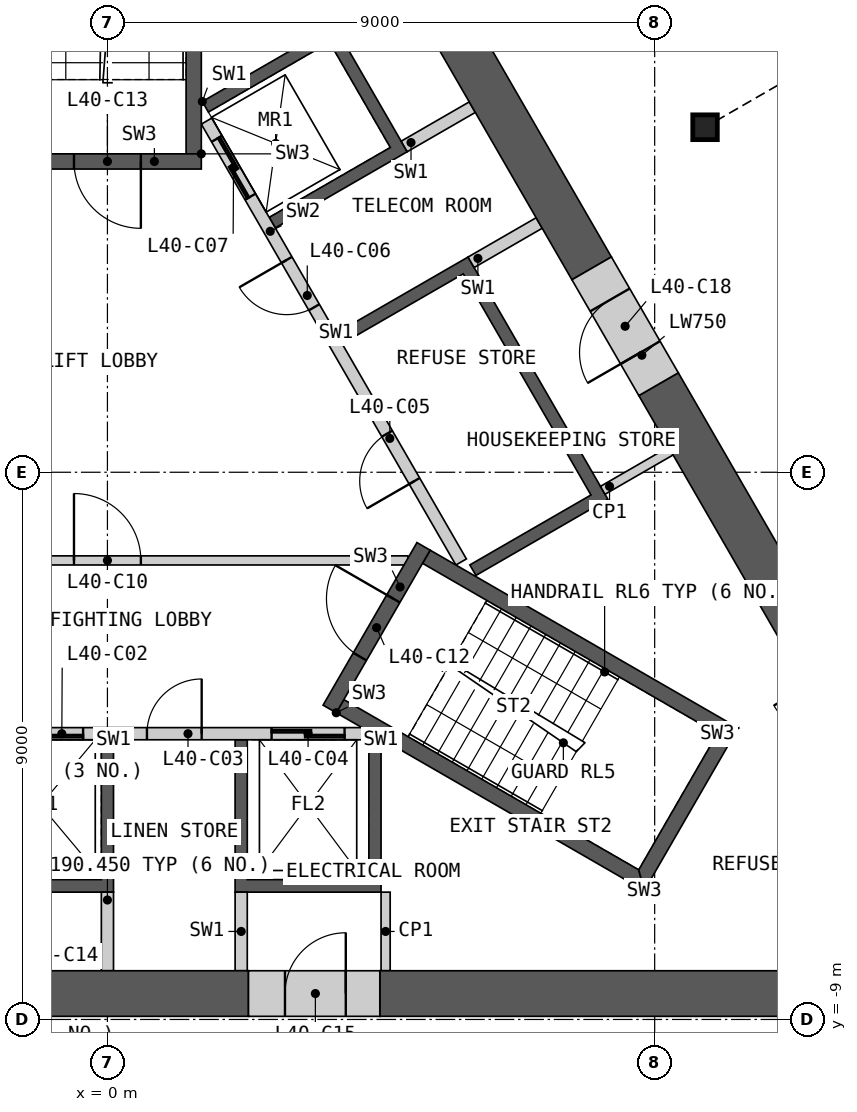
"""IFC4 building model, lengths in metres.
Left out: names, types, materials, properties, quantities, classifications, styles, units other than length and angle.
Written with IfcOpenShell. Run it as: python <this file> out.ifc"""

import sys

from ifc_helpers import new_model, si_unit, direction, frame, frame_2d, origin, origin_2d, place, context, subcontext, project, spatial, polyline, rectangle, i_section, outline, extrude, element, fill, save


model = new_model("IFC4")
c1 = context("Model", 3, precision=1e-05, world=origin(), true_north=direction((0.0, 1.0)))
c2 = subcontext(c1, "Body", "Model", "MODEL_VIEW")
j1 = project(units=[si_unit("LENGTHUNIT", "METRE"), si_unit("PLANEANGLEUNIT", "RADIAN")], contexts=[c1])
p1 = place(None, origin())
s1 = spatial("IfcSite", under=j1, at=p1, CompositionType="ELEMENT")
p2 = place(p1, origin())
s2 = spatial("IfcBuilding", under=s1, at=p2, CompositionType="ELEMENT")
p3 = place(p2, frame((0.0, 0.0, 187.2)))
s3 = spatial("IfcBuildingStorey", under=s2, at=p3, CompositionType="ELEMENT", Elevation=187.2)
p4 = place(p3, frame((9.828, 5.675, 0.0), z_axis=(0.0, 0.0, 1.0), x_axis=(1.0, 0.0, 0.0)))
e1 = element("IfcColumn", 1, at=p4, inside=s3, PredefinedType="COLUMN", context=c2, shape_type="SweptSolid", body=[
    extrude(i_section(OverallWidth=0.404, OverallDepth=0.407, WebThickness=0.027, FlangeThickness=0.044, at=origin_2d()), origin(), (0.0, 0.0, 1.0), 3.6),
])
p5 = place(p3, origin())
e2 = element("IfcWall", 2, at=p5, inside=s3, PredefinedType="SHEAR", context=c2, shape_type="SweptSolid", body=[
    extrude(outline(polyline([(4.5, -4.4), (4.5, -6.906), (2.1, -6.906), (2.1, -4.4), (2.3, -4.4), (2.3, -6.7), (4.3, -6.7), (4.3, -4.4), (4.5, -4.4)])), origin(), (0.0, 0.0, 1.0), 3.25),
])
p6 = place(p3, origin())
e3 = element("IfcWall", 3, at=p6, inside=s3, PredefinedType="SHEAR", context=c2, shape_type="SweptSolid", body=[
    extrude(outline(polyline([(0.1, -4.4), (0.1, -6.906), (-4.5, -6.906), (-4.5, -4.4), (-4.3, -4.4), (-4.3, -6.7), (-2.3, -6.7), (-2.3, -4.4), (-2.1, -4.4), (-2.1, -6.7), (-0.1, -6.7), (-0.1, -4.4), (0.1, -4.4)])), origin(), (0.0, 0.0, 1.0), 3.25),
])
p7 = place(p3, frame((-4.187, -4.3, 0.0), z_axis=(0.0, 0.0, 1.0), x_axis=(1.0, 0.0, 0.0)))
e4 = element("IfcWall", 4, at=p7, inside=s3, PredefinedType="SOLIDWALL", context=c2, shape_type="SweptSolid", body=[
    extrude(rectangle(XDim=8.373, YDim=0.2, at=frame_2d((4.187, 0.0))), origin(), (0.0, 0.0, 1.0), 3.25),
])
p8 = place(p7, frame((0.287, 0.0, 0.0)))
e5 = element("IfcOpeningElement", 5, at=p8, cuts=e4, PredefinedType="OPENING", context=c2, shape_type="SweptSolid", body=[
    extrude(rectangle(XDim=1.2, YDim=2.1, at=frame_2d((0.6, 1.05))), frame((0.0, 0.11, 0.0), z_axis=(0.0, -1.0, 0.0), x_axis=(1.0, 0.0, 0.0)), (0.0, 0.0, 1.0), 0.22),
])
p9 = place(p7, frame((2.387, 0.0, 0.0)))
e6 = element("IfcOpeningElement", 6, at=p9, cuts=e4, PredefinedType="OPENING", context=c2, shape_type="SweptSolid", body=[
    extrude(rectangle(XDim=1.4, YDim=2.1, at=frame_2d((0.7, 1.05))), frame((0.0, 0.11, 0.0), z_axis=(0.0, -1.0, 0.0), x_axis=(1.0, 0.0, 0.0)), (0.0, 0.0, 1.0), 0.22),
])
p10 = place(p7, frame((4.837, 0.0, 0.0)))
e7 = element("IfcOpeningElement", 7, at=p10, cuts=e4, PredefinedType="OPENING", context=c2, shape_type="SweptSolid", body=[
    extrude(rectangle(XDim=0.9, YDim=2.1, at=frame_2d((0.45, 1.05))), frame((0.0, 0.11, 0.0), z_axis=(0.0, -1.0, 0.0), x_axis=(1.0, 0.0, 0.0)), (0.0, 0.0, 1.0), 0.22),
])
p11 = place(p7, frame((6.887, 0.0, 0.0)))
e8 = element("IfcOpeningElement", 8, at=p11, cuts=e4, PredefinedType="OPENING", context=c2, shape_type="SweptSolid", body=[
    extrude(rectangle(XDim=1.2, YDim=2.1, at=frame_2d((0.6, 1.05))), frame((0.0, 0.11, 0.0), z_axis=(0.0, -1.0, 0.0), x_axis=(1.0, 0.0, 0.0)), (0.0, 0.0, 1.0), 0.22),
])
for number, where, z_axis, x_axis in (
    (9, (0.0, -6.906, 0.0), (0.0, 0.0, 1.0), (0.0, -1.0, 0.0)),
    (10, (2.2, -6.906, 0.0), (0.0, 0.0, 1.0), (0.0, -1.0, 0.0)),
):
    element("IfcWall", number, at=place(p3, frame(where, z_axis=z_axis, x_axis=x_axis)), inside=s3, PredefinedType="SHEAR", context=c2, shape_type="SweptSolid", body=[
        extrude(rectangle(XDim=1.293, YDim=0.2, at=frame_2d((0.646, 0.0))), origin(), (0.0, 0.0, 1.0), 3.25),
    ])
p12 = place(p3, origin())
e11 = element("IfcWall", 11, at=p12, inside=s3, PredefinedType="SHEAR", context=c2, shape_type="SweptSolid", body=[
    extrude(outline(polyline([(1.561, 6.097), (3.731, 7.35), (4.931, 5.272), (2.76, 4.019), (2.66, 4.192), (4.652, 5.342), (3.652, 7.074), (1.66, 5.924), (1.561, 6.097)])), origin(), (0.0, 0.0, 1.0), 3.25),
])
p13 = place(p3, origin())
e12 = element("IfcWall", 12, at=p13, inside=s3, PredefinedType="SHEAR", context=c2, shape_type="SweptSolid", body=[
    extrude(outline(polyline([(3.76, 2.287), (5.931, 3.54), (8.231, -0.444), (6.061, -1.697), (5.96, -1.524), (7.952, -0.374), (5.852, 3.263), (3.861, 2.113), (3.76, 2.287)])), origin(), (0.0, 0.0, 1.0), 3.25),
])
p14 = place(p3, frame((5.817, -1.476, 0.0), z_axis=(0.0, 0.0, 1.0), x_axis=(-0.500002616675, 0.866023893041, 0.0)))
e13 = element("IfcWall", 13, at=p14, inside=s3, PredefinedType="SOLIDWALL", context=c2, shape_type="SweptSolid", body=[
    extrude(rectangle(XDim=8.373, YDim=0.2, at=frame_2d((4.187, 0.0))), origin(), (0.0, 0.0, 1.0), 3.25),
])
p15 = place(p14, frame((1.537, 0.0, 0.0)))
e14 = element("IfcOpeningElement", 14, at=p15, cuts=e13, PredefinedType="OPENING", context=c2, shape_type="SweptSolid", body=[
    extrude(rectangle(XDim=0.9, YDim=2.1, at=frame_2d((0.45, 1.05))), frame((0.0, 0.11, 0.0), z_axis=(0.0, -1.0, 0.0), x_axis=(1.0, 0.0, 0.0)), (0.0, 0.0, 1.0), 0.22),
])
p16 = place(p14, frame((4.837, 0.0, 0.0)))
e15 = element("IfcOpeningElement", 15, at=p16, cuts=e13, PredefinedType="OPENING", context=c2, shape_type="SweptSolid", body=[
    extrude(rectangle(XDim=0.9, YDim=2.1, at=frame_2d((0.45, 1.05))), frame((0.0, 0.11, 0.0), z_axis=(0.0, -1.0, 0.0), x_axis=(1.0, 0.0, 0.0)), (0.0, 0.0, 1.0), 0.22),
])
p17 = place(p14, frame((6.937, 0.0, 0.0)))
e16 = element("IfcOpeningElement", 16, at=p17, cuts=e13, PredefinedType="OPENING", context=c2, shape_type="SweptSolid", body=[
    extrude(rectangle(XDim=1.1, YDim=2.1, at=frame_2d((0.55, 1.05))), frame((0.0, 0.11, 0.0), z_axis=(0.0, -1.0, 0.0), x_axis=(1.0, 0.0, 0.0)), (0.0, 0.0, 1.0), 0.22),
])
p18 = place(p3, frame((5.981, 3.453, 0.0), z_axis=(0.0, 0.0, 1.0), x_axis=(0.865968639725, 0.500098305348, 0.0)))
e17 = element("IfcWall", 17, at=p18, inside=s3, PredefinedType="SHEAR", context=c2, shape_type="SweptSolid", body=[
    extrude(rectangle(XDim=1.293, YDim=0.2, at=frame_2d((0.646, 0.0))), origin(), (0.0, 0.0, 1.0), 3.25),
])
p19 = place(p3, frame((4.881, 5.358, 0.0), z_axis=(0.0, 0.0, 1.0), x_axis=(0.866084958089, 0.499896834728, 0.0)))
e18 = element("IfcWall", 18, at=p19, inside=s3, PredefinedType="SHEAR", context=c2, shape_type="SweptSolid", body=[
    extrude(rectangle(XDim=1.293, YDim=0.2, at=frame_2d((0.646, 0.0))), origin(), (0.0, 0.0, 1.0), 3.25),
])
p20 = place(p3, frame((-4.941, -1.45, 0.0), z_axis=(0.0, 0.0, 1.0), x_axis=(1.0, 0.0, 0.0)))
e19 = element("IfcWall", 19, at=p20, inside=s3, PredefinedType="PARTITIONING", context=c2, shape_type="SweptSolid", body=[
    extrude(rectangle(XDim=9.882, YDim=0.15, at=frame_2d((4.941, 0.0))), origin(), (0.0, 0.0, 1.0), 3.25),
])
p21 = place(p20, frame((4.391, 0.0, 0.0)))
e20 = element("IfcOpeningElement", 20, at=p21, cuts=e19, PredefinedType="OPENING", context=c2, shape_type="SweptSolid", body=[
    extrude(rectangle(XDim=1.1, YDim=2.1, at=frame_2d((0.55, 1.05))), frame((0.0, 0.085, 0.0), z_axis=(0.0, -1.0, 0.0), x_axis=(1.0, 0.0, 0.0)), (0.0, 0.0, 1.0), 0.17),
])
p22 = place(p3, origin())
e21 = element("IfcWall", 21, at=p22, inside=s3, PredefinedType="SHEAR", context=c2, shape_type="SweptSolid", body=[
    extrude(outline(polyline([(3.763, -3.956), (8.83, -6.881), (8.738, -6.539), (3.888, -3.739), (3.763, -3.956)])), origin(), (0.0, 0.0, 1.0), 3.25),
])
p23 = place(p3, origin())
e22 = element("IfcWall", 22, at=p23, inside=s3, PredefinedType="SHEAR", context=c2, shape_type="SweptSolid", body=[
    extrude(outline(polyline([(8.83, -6.881), (10.374, -4.206), (10.032, -4.298), (8.738, -6.539), (8.83, -6.881)])), origin(), (0.0, 0.0, 1.0), 3.25),
])
p24 = place(p3, origin())
e23 = element("IfcWall", 23, at=p24, inside=s3, PredefinedType="SHEAR", context=c2, shape_type="SweptSolid", body=[
    extrude(outline(polyline([(10.032, -4.298), (10.374, -4.206), (5.307, -1.281), (5.182, -1.498), (10.032, -4.298)])), origin(), (0.0, 0.0, 1.0), 3.25),
])
p25 = place(p3, frame((3.655, -3.893, 0.0), z_axis=(0.0, 0.0, 1.0), x_axis=(0.499982516597, 0.866035497597, 0.0)))
e24 = element("IfcWall", 24, at=p25, inside=s3, PredefinedType="SHEAR", context=c2, shape_type="SweptSolid", body=[
    extrude(rectangle(XDim=3.088, YDim=0.25, at=frame_2d((1.544, 0.0))), origin(), (0.0, 0.0, 1.0), 3.25),
])
p26 = place(p25, frame((0.994, 0.0, 0.0)))
e25 = element("IfcOpeningElement", 25, at=p26, cuts=e24, PredefinedType="OPENING", context=c2, shape_type="SweptSolid", body=[
    extrude(rectangle(XDim=1.1, YDim=2.1, at=frame_2d((0.55, 1.05))), frame((0.0, 0.135, 0.0), z_axis=(0.0, -1.0, 0.0), x_axis=(1.0, 0.0, 0.0)), (0.0, 0.0, 1.0), 0.27),
])
p27 = place(p3, origin())
e26 = element("IfcWall", 26, at=p27, inside=s3, PredefinedType="SHEAR", context=c2, shape_type="SweptSolid", body=[
    extrude(outline(polyline([(1.544, 5.237), (1.544, 11.087), (1.294, 10.837), (1.294, 5.237), (1.544, 5.237)])), origin(), (0.0, 0.0, 1.0), 3.25),
])
p28 = place(p3, frame((1.544, 5.112, 0.0), z_axis=(0.0, 0.0, 1.0), x_axis=(-1.0, 0.0, 0.0)))
e27 = element("IfcWall", 27, at=p28, inside=s3, PredefinedType="SHEAR", context=c2, shape_type="SweptSolid", body=[
    extrude(rectangle(XDim=3.088, YDim=0.25, at=frame_2d((1.544, 0.0))), origin(), (0.0, 0.0, 1.0), 3.25),
])
p29 = place(p28, frame((0.994, 0.0, 0.0)))
e28 = element("IfcOpeningElement", 28, at=p29, cuts=e27, PredefinedType="OPENING", context=c2, shape_type="SweptSolid", body=[
    extrude(rectangle(XDim=1.1, YDim=2.1, at=frame_2d((0.55, 1.05))), frame((0.0, 0.135, 0.0), z_axis=(0.0, -1.0, 0.0), x_axis=(1.0, 0.0, 0.0)), (0.0, 0.0, 1.0), 0.27),
])
for number, where, z_axis, x_axis in (
    (29, (4.575, -6.906, 0.0), (0.0, 0.0, 1.0), (0.0, -1.0, 0.0)),
    (30, (9.266, 0.349, 0.0), (0.0, 0.0, 1.0), (-0.866, -0.5, 0.0)),
):
    element("IfcWall", number, at=place(p3, frame(where, z_axis=z_axis, x_axis=x_axis)), inside=s3, PredefinedType="PARTITIONING", context=c2, shape_type="SweptSolid", body=[
        extrude(rectangle(XDim=1.293, YDim=0.15, at=frame_2d((0.646, 0.0))), origin(), (0.0, 0.0, 1.0), 3.25),
    ])
p30 = place(p3, frame((4.48, -8.574, 0.0), z_axis=(0.0, 0.0, 1.0), x_axis=(1.0, 0.0, 0.0)))
e31 = element("IfcWall", 31, at=p30, inside=s3, PredefinedType="SHEAR", context=c2, shape_type="SweptSolid", body=[
    extrude(rectangle(XDim=9.721, YDim=0.75, at=frame_2d((4.86, 0.0))), origin(), (0.0, 0.0, 1.0), 3.25),
])
p31 = place(p3, frame((-1.2, -8.574, 0.0), z_axis=(0.0, 0.0, 1.0), x_axis=(1.0, 0.0, 0.0)))
e32 = element("IfcWall", 32, at=p31, inside=s3, PredefinedType="SHEAR", context=c2, shape_type="SweptSolid", body=[
    extrude(rectangle(XDim=3.52, YDim=0.75, at=frame_2d((1.76, 0.0))), origin(), (0.0, 0.0, 1.0), 3.25),
])
p32 = place(p3, frame((7.964, 3.354, 0.0), z_axis=(0.0, 0.0, 1.0), x_axis=(-0.50002928721, 0.866008494146, 0.0)))
e33 = element("IfcWall", 33, at=p32, inside=s3, PredefinedType="SHEAR", context=c2, shape_type="SweptSolid", body=[
    extrude(rectangle(XDim=6.405, YDim=0.75, at=frame_2d((3.203, 0.0))), origin(), (0.0, 0.0, 1.0), 3.25),
])
p33 = place(p3, frame((11.527, -2.817, 0.0), z_axis=(0.0, 0.0, 1.0), x_axis=(-0.50001992892, 0.866013897511, 0.0)))
e34 = element("IfcWall", 34, at=p33, inside=s3, PredefinedType="SHEAR", context=c2, shape_type="SweptSolid", body=[
    extrude(rectangle(XDim=4.926, YDim=0.75, at=frame_2d((2.463, 0.0))), origin(), (0.0, 0.0, 1.0), 3.25),
])
p34 = place(p3, frame((2.32, -8.574, 0.0), z_axis=(0.0, 0.0, 1.0), x_axis=(1.0, 0.0, 0.0)))
e35 = element("IfcWall", 35, at=p34, inside=s3, PredefinedType="SHEAR", context=c2, shape_type="SweptSolid", body=[
    extrude(rectangle(XDim=2.16, YDim=0.75, at=frame_2d((1.08, 0.0))), origin(), (0.0, 0.0, 1.0), 3.25),
])
p35 = place(p34, frame((0.6, 0.0, 0.0)))
e36 = element("IfcOpeningElement", 36, at=p35, cuts=e35, PredefinedType="OPENING", context=c2, shape_type="SweptSolid", body=[
    extrude(rectangle(XDim=1.0, YDim=2.1, at=frame_2d((0.5, 1.05))), frame((0.0, 0.385, 0.0), z_axis=(0.0, -1.0, 0.0), x_axis=(1.0, 0.0, 0.0)), (0.0, 0.0, 1.0), 0.77),
])
p36 = place(p3, frame((9.064, 1.448, 0.0), z_axis=(0.0, 0.0, 1.0), x_axis=(-0.50002983664, 0.866008176907, 0.0)))
e37 = element("IfcWall", 37, at=p36, inside=s3, PredefinedType="SHEAR", context=c2, shape_type="SweptSolid", body=[
    extrude(rectangle(XDim=2.2, YDim=0.75, at=frame_2d((1.1, 0.0))), origin(), (0.0, 0.0, 1.0), 3.25),
])
p37 = place(p36, frame((0.6, 0.0, 0.0)))
e38 = element("IfcOpeningElement", 38, at=p37, cuts=e37, PredefinedType="OPENING", context=c2, shape_type="SweptSolid", body=[
    extrude(rectangle(XDim=1.0, YDim=2.1, at=frame_2d((0.5, 1.05))), frame((0.0, 0.385, 0.0), z_axis=(0.0, -1.0, 0.0), x_axis=(1.0, 0.0, 0.0)), (0.0, 0.0, 1.0), 0.77),
])
p38 = place(p3, frame((5.377, 19.385, 0.0), z_axis=(0.0, 0.0, 1.0), x_axis=(0.500000757641, -0.86602496636, 0.0)))
e39 = element("IfcWall", 39, at=p38, inside=s3, PredefinedType="PARTITIONING", context=c2, shape_type="SweptSolid", body=[
    extrude(rectangle(XDim=28.198, YDim=0.2, at=frame_2d((14.099, 0.0))), origin(), (0.0, 0.0, 1.0), 3.25),
])
p39 = place(p38, frame((22.735, 0.0, 0.0)))
e40 = element("IfcOpeningElement", 40, at=p39, cuts=e39, PredefinedType="OPENING", context=c2, shape_type="SweptSolid", body=[
    extrude(rectangle(XDim=1.8, YDim=2.1, at=frame_2d((0.9, 1.05))), frame((0.0, 0.11, 0.0), z_axis=(0.0, -1.0, 0.0), x_axis=(1.0, 0.0, 0.0)), (0.0, 0.0, 1.0), 0.22),
])
p40 = place(p38, frame((14.402, 0.0, 0.0)))
e41 = element("IfcOpeningElement", 41, at=p40, cuts=e39, PredefinedType="OPENING", context=c2, shape_type="SweptSolid", body=[
    extrude(rectangle(XDim=1.0, YDim=2.1, at=frame_2d((0.5, 1.05))), frame((0.0, 0.11, 0.0), z_axis=(0.0, -1.0, 0.0), x_axis=(1.0, 0.0, 0.0)), (0.0, 0.0, 1.0), 0.22),
])
p41 = place(p38, frame((12.796, 0.0, 0.0)))
e42 = element("IfcOpeningElement", 42, at=p41, cuts=e39, PredefinedType="OPENING", context=c2, shape_type="SweptSolid", body=[
    extrude(rectangle(XDim=1.0, YDim=2.1, at=frame_2d((0.5, 1.05))), frame((0.0, 0.11, 0.0), z_axis=(0.0, -1.0, 0.0), x_axis=(1.0, 0.0, 0.0)), (0.0, 0.0, 1.0), 0.22),
])
p42 = place(p38, frame((4.164, 0.0, 0.0)))
e43 = element("IfcOpeningElement", 43, at=p42, cuts=e39, PredefinedType="OPENING", context=c2, shape_type="SweptSolid", body=[
    extrude(rectangle(XDim=1.0, YDim=2.1, at=frame_2d((0.5, 1.05))), frame((0.0, 0.11, 0.0), z_axis=(0.0, -1.0, 0.0), x_axis=(1.0, 0.0, 0.0)), (0.0, 0.0, 1.0), 0.22),
])
p43 = place(p38, frame((1.452, 0.0, 0.0)))
e44 = element("IfcOpeningElement", 44, at=p43, cuts=e39, PredefinedType="OPENING", context=c2, shape_type="SweptSolid", body=[
    extrude(rectangle(XDim=0.95, YDim=2.1, at=frame_2d((0.475, 1.05))), frame((0.0, 0.11, 0.0), z_axis=(0.0, -1.0, 0.0), x_axis=(1.0, 0.0, 0.0)), (0.0, 0.0, 1.0), 0.22),
])
p44 = place(p9, origin())
e45 = element("IfcDoor", 45, at=p44, inside=s3, OperationType="SLIDING_TO_LEFT", PredefinedType="DOOR", context=c2, shape_type="SweptSolid", body=[
    extrude(rectangle(XDim=1.4, YDim=2.1, at=frame_2d((0.7, 1.05))), frame((0.0, 0.025, 0.0), z_axis=(0.0, -1.0, 0.0), x_axis=(1.0, 0.0, 0.0)), (0.0, 0.0, 1.0), 0.05),
])
fill(e6, e45)
p45 = place(p10, origin())
e46 = element("IfcDoor", 46, at=p45, inside=s3, OperationType="SINGLE_SWING_RIGHT", PredefinedType="DOOR", context=c2, shape_type="SweptSolid", body=[
    extrude(rectangle(XDim=0.9, YDim=2.1, at=frame_2d((0.45, 1.05))), frame((0.0, 0.025, 0.0), z_axis=(0.0, -1.0, 0.0), x_axis=(1.0, 0.0, 0.0)), (0.0, 0.0, 1.0), 0.05),
])
fill(e7, e46)
p46 = place(p11, origin())
e47 = element("IfcDoor", 47, at=p46, inside=s3, OperationType="SLIDING_TO_LEFT", PredefinedType="DOOR", context=c2, shape_type="SweptSolid", body=[
    extrude(rectangle(XDim=1.2, YDim=2.1, at=frame_2d((0.6, 1.05))), frame((0.0, 0.025, 0.0), z_axis=(0.0, -1.0, 0.0), x_axis=(1.0, 0.0, 0.0)), (0.0, 0.0, 1.0), 0.05),
])
fill(e8, e47)
p47 = place(p15, origin())
e48 = element("IfcDoor", 48, at=p47, inside=s3, OperationType="SINGLE_SWING_LEFT", PredefinedType="DOOR", context=c2, shape_type="SweptSolid", body=[
    extrude(rectangle(XDim=0.9, YDim=2.1, at=frame_2d((0.45, 1.05))), frame((0.0, 0.025, 0.0), z_axis=(0.0, -1.0, 0.0), x_axis=(1.0, 0.0, 0.0)), (0.0, 0.0, 1.0), 0.05),
])
fill(e14, e48)
p48 = place(p16, origin())
e49 = element("IfcDoor", 49, at=p48, inside=s3, OperationType="SINGLE_SWING_RIGHT", PredefinedType="DOOR", context=c2, shape_type="SweptSolid", body=[
    extrude(rectangle(XDim=0.9, YDim=2.1, at=frame_2d((0.45, 1.05))), frame((0.0, 0.025, 0.0), z_axis=(0.0, -1.0, 0.0), x_axis=(1.0, 0.0, 0.0)), (0.0, 0.0, 1.0), 0.05),
])
fill(e15, e49)
p49 = place(p17, origin())
e50 = element("IfcDoor", 50, at=p49, inside=s3, OperationType="SLIDING_TO_LEFT", PredefinedType="DOOR", context=c2, shape_type="SweptSolid", body=[
    extrude(rectangle(XDim=1.1, YDim=2.1, at=frame_2d((0.55, 1.05))), frame((0.0, 0.025, 0.0), z_axis=(0.0, -1.0, 0.0), x_axis=(1.0, 0.0, 0.0)), (0.0, 0.0, 1.0), 0.05),
])
fill(e16, e50)
p50 = place(p21, origin())
e51 = element("IfcDoor", 51, at=p50, inside=s3, OperationType="SINGLE_SWING_LEFT", PredefinedType="DOOR", context=c2, shape_type="SweptSolid", body=[
    extrude(rectangle(XDim=1.1, YDim=2.1, at=frame_2d((0.55, 1.05))), frame((0.0, 0.025, 0.0), z_axis=(0.0, -1.0, 0.0), x_axis=(1.0, 0.0, 0.0)), (0.0, 0.0, 1.0), 0.05),
])
fill(e20, e51)
p51 = place(p26, origin())
e52 = element("IfcDoor", 52, at=p51, inside=s3, OperationType="SINGLE_SWING_RIGHT", PredefinedType="DOOR", context=c2, shape_type="SweptSolid", body=[
    extrude(rectangle(XDim=1.1, YDim=2.1, at=frame_2d((0.55, 1.05))), frame((0.0, 0.025, 0.0), z_axis=(0.0, -1.0, 0.0), x_axis=(1.0, 0.0, 0.0)), (0.0, 0.0, 1.0), 0.05),
])
fill(e25, e52)
p52 = place(p29, origin())
e53 = element("IfcDoor", 53, at=p52, inside=s3, OperationType="SINGLE_SWING_LEFT", PredefinedType="DOOR", context=c2, shape_type="SweptSolid", body=[
    extrude(rectangle(XDim=1.1, YDim=2.1, at=frame_2d((0.55, 1.05))), frame((0.0, 0.025, 0.0), z_axis=(0.0, -1.0, 0.0), x_axis=(1.0, 0.0, 0.0)), (0.0, 0.0, 1.0), 0.05),
])
fill(e28, e53)
p53 = place(p35, origin())
e54 = element("IfcDoor", 54, at=p53, inside=s3, OperationType="SINGLE_SWING_RIGHT", PredefinedType="DOOR", context=c2, shape_type="SweptSolid", body=[
    extrude(rectangle(XDim=1.0, YDim=2.1, at=frame_2d((0.5, 1.05))), frame((0.0, 0.13, 0.0), z_axis=(0.0, -1.0, 0.0), x_axis=(1.0, 0.0, 0.0)), (0.0, 0.0, 1.0), 0.05),
])
fill(e36, e54)
p54 = place(p37, origin())
e55 = element("IfcDoor", 55, at=p54, inside=s3, OperationType="SINGLE_SWING_LEFT", PredefinedType="DOOR", context=c2, shape_type="SweptSolid", body=[
    extrude(rectangle(XDim=1.0, YDim=2.1, at=frame_2d((0.5, 1.05))), frame((0.0, 0.13, 0.0), z_axis=(0.0, -1.0, 0.0), x_axis=(1.0, 0.0, 0.0)), (0.0, 0.0, 1.0), 0.05),
])
fill(e38, e55)
save(model, sys.argv[1])
